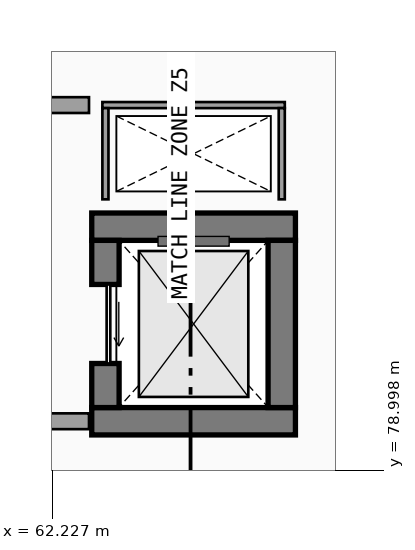
"""IFC4 building model, lengths in metres.
Left out: names, types, materials, properties, quantities, classifications, styles, units other than length and angle.
Written with IfcOpenShell. Run it as: python <this file> out.ifc"""

import sys

from ifc_helpers import new_model, si_unit, direction, frame, frame_2d, origin, place, context, subcontext, project, spatial, rectangle, extrude, element, fill, save


model = new_model("IFC4")
c1 = context("Model", 3, precision=1e-05, world=origin(), true_north=direction((0.0, 1.0)))
c2 = subcontext(c1, "Body", "Model", "MODEL_VIEW")
j1 = project(units=[si_unit("LENGTHUNIT", "METRE"), si_unit("PLANEANGLEUNIT", "RADIAN")], contexts=[c1])
p1 = place(None, origin())
s1 = spatial("IfcSite", under=j1, at=p1, CompositionType="ELEMENT")
p2 = place(p1, origin())
s2 = spatial("IfcBuilding", under=s1, at=p2, CompositionType="ELEMENT")
p3 = place(p2, frame((0.0, 0.0, 18.6)))
s3 = spatial("IfcBuildingStorey", under=s2, at=p3, CompositionType="ELEMENT", Elevation=18.6)
for number, where, z_axis, x_axis in (
    (1, (62.875, 79.8, 0.0), (0.0, 0.0, 1.0), (1.0, 0.0, 0.0)),
    (2, (66.225, 83.0, 0.0), (0.0, 0.0, 1.0), (-1.0, 0.0, 0.0)),
):
    element("IfcWall", number, at=place(p3, frame(where, z_axis=z_axis, x_axis=x_axis)), inside=s3, PredefinedType="SHEAR", context=c2, shape_type="SweptSolid", body=[
        extrude(rectangle(XDim=3.35, YDim=0.45, at=frame_2d((1.675, 0.0))), origin(), (0.0, 0.0, 1.0), 4.24),
    ])
p4 = place(p3, frame((63.1, 82.775, 0.0), z_axis=(0.0, 0.0, 1.0), x_axis=(0.0, -1.0, 0.0)))
e3 = element("IfcWall", 3, at=p4, inside=s3, PredefinedType="SHEAR", context=c2, shape_type="SweptSolid", body=[
    extrude(rectangle(XDim=2.75, YDim=0.45, at=frame_2d((1.375, 0.0))), origin(), (0.0, 0.0, 1.0), 4.24),
])
p5 = place(p4, frame((0.725, 0.0, 0.0), z_axis=(0.0, 0.0, 1.0), x_axis=(1.0, 0.0, 0.0)))
e4 = element("IfcOpeningElement", 4, at=p5, cuts=e3, PredefinedType="OPENING", context=c2, shape_type="SweptSolid", body=[
    extrude(rectangle(XDim=1.3, YDim=2.25, at=frame_2d((0.65, 1.125))), frame((0.0, 0.235, 0.0), z_axis=(0.0, -1.0, 0.0), x_axis=(1.0, 0.0, 0.0)), (0.0, 0.0, 1.0), 0.47),
])
p6 = place(p3, frame((66.0, 80.025, 0.0), z_axis=(0.0, 0.0, 1.0), x_axis=(0.0, 1.0, 0.0)))
e5 = element("IfcWall", 5, at=p6, inside=s3, PredefinedType="SHEAR", context=c2, shape_type="SweptSolid", body=[
    extrude(rectangle(XDim=2.75, YDim=0.45, at=frame_2d((1.375, 0.0))), origin(), (0.0, 0.0, 1.0), 4.24),
])
p7 = place(p3, frame((66.05, 85.0, 0.0), z_axis=(0.0, 0.0, 1.0), x_axis=(-1.0, 0.0, 0.0)))
e6 = element("IfcWall", 6, at=p7, inside=s3, PredefinedType="PARTITIONING", context=c2, shape_type="SweptSolid", body=[
    extrude(rectangle(XDim=3.0, YDim=0.1, at=frame_2d((1.5, 0.0))), origin(), (0.0, 0.0, 1.0), 4.24),
])
for number, where, z_axis, x_axis in (
    (7, (63.1, 84.95, 0.0), (0.0, 0.0, 1.0), (0.0, -1.0, 0.0)),
    (8, (66.0, 83.45, 0.0), (0.0, 0.0, 1.0), (0.0, 1.0, 0.0)),
):
    element("IfcWall", number, at=place(p3, frame(where, z_axis=z_axis, x_axis=x_axis)), inside=s3, PredefinedType="PARTITIONING", context=c2, shape_type="SweptSolid", body=[
        extrude(rectangle(XDim=1.5, YDim=0.1, at=frame_2d((0.75, 0.0))), origin(), (0.0, 0.0, 1.0), 4.24),
    ])
p8 = place(p3, frame((59.07, 79.8, 0.0), z_axis=(0.0, 0.0, 1.0), x_axis=(1.0, 0.0, 0.0)))
e9 = element("IfcWall", 9, at=p8, inside=s3, PredefinedType="SOLIDWALL", context=c2, shape_type="SweptSolid", body=[
    extrude(rectangle(XDim=3.76, YDim=0.26, at=frame_2d((1.88, 0.0))), origin(), (0.0, 0.0, 1.0), 4.24),
])
p9 = place(p3, frame((62.83, 85.0, 0.0), z_axis=(0.0, 0.0, 1.0), x_axis=(-1.0, 0.0, 0.0)))
e10 = element("IfcWall", 10, at=p9, inside=s3, PredefinedType="SOLIDWALL", context=c2, shape_type="SweptSolid", body=[
    extrude(rectangle(XDim=3.76, YDim=0.26, at=frame_2d((1.88, 0.0))), origin(), (0.0, 0.0, 1.0), 4.24),
])
p10 = place(p9, frame((2.805, 0.0, 0.0), z_axis=(0.0, 0.0, 1.0), x_axis=(-1.0, 0.0, 0.0)))
e11 = element("IfcOpeningElement", 11, at=p10, cuts=e10, PredefinedType="OPENING", context=c2, shape_type="SweptSolid", body=[
    extrude(rectangle(XDim=1.85, YDim=2.25, at=frame_2d((0.925, 1.125))), frame((0.0, 0.14, 0.0), z_axis=(0.0, -1.0, 0.0), x_axis=(1.0, 0.0, 0.0)), (0.0, 0.0, 1.0), 0.28),
])
p11 = place(p5, origin())
e12 = element("IfcDoor", 12, at=p11, inside=s3, OperationType="SLIDING_TO_RIGHT", PredefinedType="DOOR", context=c2, shape_type="SweptSolid", body=[
    extrude(rectangle(XDim=1.3, YDim=2.25, at=frame_2d((0.65, 1.125))), frame((0.0, 0.025, 0.0), z_axis=(0.0, -1.0, 0.0), x_axis=(1.0, 0.0, 0.0)), (0.0, 0.0, 1.0), 0.05),
])
fill(e4, e12)
save(model, sys.argv[1])
